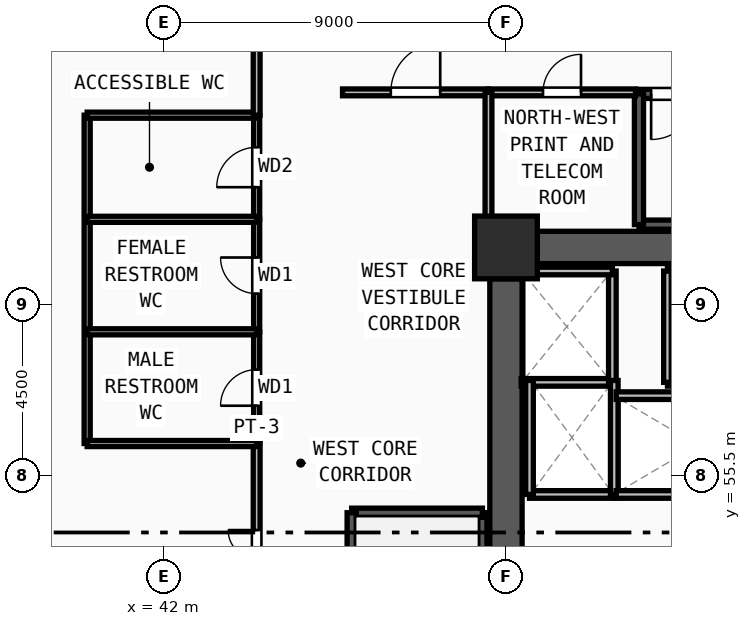
"""IFC4 building model, lengths in metres.
Left out: names, types, materials, properties, quantities, classifications, styles, units other than length and angle.
Written with IfcOpenShell. Run it as: python <this file> out.ifc"""

import sys

from ifc_helpers import new_model, si_unit, direction, frame, frame_2d, origin, origin_2d, place, context, subcontext, project, spatial, rectangle, extrude, source, transform, mapped, element, fill, save


model = new_model("IFC4")
c1 = context("Model", 3, precision=1e-05, world=origin(), true_north=direction((0.0, 1.0)))
c2 = subcontext(c1, "Body", "Model", "MODEL_VIEW")
j1 = project(units=[si_unit("LENGTHUNIT", "METRE"), si_unit("PLANEANGLEUNIT", "RADIAN")], contexts=[c1])
p1 = place(None, origin())
s1 = spatial("IfcSite", under=j1, at=p1, CompositionType="ELEMENT")
p2 = place(p1, origin())
s2 = spatial("IfcBuilding", under=s1, at=p2, CompositionType="ELEMENT")
p3 = place(p2, frame((0.0, 0.0, 28.5)))
s3 = spatial("IfcBuildingStorey", under=s2, at=p3, CompositionType="ELEMENT", Elevation=28.5)
m1 = source(origin(), c2, "Body", "SweptSolid", [
    extrude(rectangle(XDim=1.65, YDim=1.65, at=origin_2d()), origin(), (0.0, 0.0, 1.0), 3.75),
])
p4 = place(p3, frame((51.0, 61.5, 0.0), z_axis=(0.0, 0.0, 1.0), x_axis=(1.0, 0.0, 0.0)))
e1 = element("IfcColumn", 1, at=p4, inside=s3, PredefinedType="COLUMN", context=c2, shape_type="MappedRepresentation", body=[
    mapped(m1, transform((0.0, 0.0, 0.0), x_axis=(1.0, 0.0, 0.0), y_axis=(0.0, 1.0, 0.0), z_axis=(0.0, 0.0, 1.0), scale=1.0)),
])
p5 = place(p3, frame((51.825, 61.5, 0.0), z_axis=(0.0, 0.0, 1.0), x_axis=(1.0, 0.0, 0.0)))
e2 = element("IfcWall", 2, at=p5, inside=s3, PredefinedType="SHEAR", context=c2, shape_type="SweptSolid", body=[
    extrude(rectangle(XDim=7.35, YDim=0.85, at=frame_2d((3.675, 0.0))), origin(), (0.0, 0.0, 1.0), 3.57),
])
p6 = place(p3, frame((51.0, 47.325, 0.0), z_axis=(0.0, 0.0, 1.0), x_axis=(0.0, 1.0, 0.0)))
e3 = element("IfcWall", 3, at=p6, inside=s3, PredefinedType="SHEAR", context=c2, shape_type="SweptSolid", body=[
    extrude(rectangle(XDim=13.35, YDim=0.85, at=frame_2d((6.675, 0.0))), origin(), (0.0, 0.0, 1.0), 3.57),
])
p7 = place(p3, frame((50.38, 46.7, 0.0), z_axis=(0.0, 0.0, 1.0), x_axis=(0.0, 1.0, 0.0)))
e4 = element("IfcWall", 4, at=p7, inside=s3, PredefinedType="SOLIDWALL", context=c2, shape_type="SweptSolid", body=[
    extrude(rectangle(XDim=7.82, YDim=0.24, at=frame_2d((3.91, 0.0))), origin(), (0.0, 0.0, 1.0), 3.57),
])
p8 = place(p3, frame((50.38, 54.52, 0.0), z_axis=(0.0, 0.0, 1.0), x_axis=(-1.0, 0.0, 0.0)))
e5 = element("IfcWall", 5, at=p8, inside=s3, PredefinedType="SOLIDWALL", context=c2, shape_type="SweptSolid", body=[
    extrude(rectangle(XDim=3.44, YDim=0.24, at=frame_2d((1.72, 0.0))), origin(), (0.0, 0.0, 1.0), 3.57),
])
p9 = place(p3, frame((46.94, 54.52, 0.0), z_axis=(0.0, 0.0, 1.0), x_axis=(0.0, -1.0, 0.0)))
e6 = element("IfcWall", 6, at=p9, inside=s3, PredefinedType="SOLIDWALL", context=c2, shape_type="SweptSolid", body=[
    extrude(rectangle(XDim=7.82, YDim=0.24, at=frame_2d((3.91, 0.0))), origin(), (0.0, 0.0, 1.0), 3.57),
])
m2 = source(origin(), c2, "Body", "SweptSolid", [
    extrude(rectangle(XDim=1.2, YDim=2.2, at=frame_2d((0.6, 1.1))), frame((0.0, 0.13, 0.0), z_axis=(0.0, -1.0, 0.0), x_axis=(1.0, 0.0, 0.0)), (0.0, 0.0, 1.0), 0.26),
])
p10 = place(p9, frame((6.3, 0.0, 0.0)))
e7 = element("IfcOpeningElement", 7, at=p10, cuts=e6, PredefinedType="OPENING", context=c2, shape_type="MappedRepresentation", body=[
    mapped(m2, transform((0.0, 0.0, 0.0), x_axis=(1.0, 0.0, 0.0), y_axis=(0.0, 1.0, 0.0), z_axis=(0.0, 0.0, 1.0), scale=1.0)),
])
p11 = place(p3, frame((54.5, 62.1, 0.0), z_axis=(0.0, 0.0, 1.0), x_axis=(1.0, 0.0, 0.0)))
e8 = element("IfcWall", 8, at=p11, inside=s3, PredefinedType="SOLIDWALL", context=c2, shape_type="SweptSolid", body=[
    extrude(rectangle(XDim=7.82, YDim=0.24, at=frame_2d((3.91, 0.0))), origin(), (0.0, 0.0, 1.0), 3.57),
])
p12 = place(p3, frame((62.32, 65.54, 0.0), z_axis=(0.0, 0.0, 1.0), x_axis=(-1.0, 0.0, 0.0)))
e9 = element("IfcWall", 9, at=p12, inside=s3, PredefinedType="SOLIDWALL", context=c2, shape_type="SweptSolid", body=[
    extrude(rectangle(XDim=7.82, YDim=0.24, at=frame_2d((3.91, 0.0))), origin(), (0.0, 0.0, 1.0), 3.57),
])
p13 = place(p12, frame((6.3, 0.0, 0.0)))
e10 = element("IfcOpeningElement", 10, at=p13, cuts=e9, PredefinedType="OPENING", context=c2, shape_type="MappedRepresentation", body=[
    mapped(m2, transform((0.0, 0.0, 0.0), x_axis=(1.0, 0.0, 0.0), y_axis=(0.0, 1.0, 0.0), z_axis=(0.0, 0.0, 1.0), scale=1.0)),
])
p14 = place(p3, frame((54.5, 65.54, 0.0), z_axis=(0.0, 0.0, 1.0), x_axis=(0.0, -1.0, 0.0)))
e11 = element("IfcWall", 11, at=p14, inside=s3, PredefinedType="SOLIDWALL", context=c2, shape_type="SweptSolid", body=[
    extrude(rectangle(XDim=3.44, YDim=0.24, at=frame_2d((1.72, 0.0))), origin(), (0.0, 0.0, 1.0), 3.57),
])
for number, where, z_axis, x_axis in (
    (12, (55.25, 57.95, 0.0), (0.0, 0.0, 1.0), (1.0, 0.0, 0.0)),
    (13, (57.65, 60.88, 0.0), (0.0, 0.0, 1.0), (-1.0, 0.0, 0.0)),
):
    element("IfcWall", number, at=place(p3, frame(where, z_axis=z_axis, x_axis=x_axis)), inside=s3, PredefinedType="SOLIDWALL", context=c2, shape_type="SweptSolid", body=[
        extrude(rectangle(XDim=2.4, YDim=0.2, at=frame_2d((1.2, 0.0))), origin(), (0.0, 0.0, 1.0), 3.57),
    ])
p15 = place(p3, frame((55.25, 60.88, 0.0), z_axis=(0.0, 0.0, 1.0), x_axis=(0.0, -1.0, 0.0)))
e14 = element("IfcWall", 14, at=p15, inside=s3, PredefinedType="SOLIDWALL", context=c2, shape_type="SweptSolid", body=[
    extrude(rectangle(XDim=2.93, YDim=0.2, at=frame_2d((1.465, 0.0))), origin(), (0.0, 0.0, 1.0), 3.57),
])
p16 = place(p3, frame((51.4, 57.95, 0.0), z_axis=(0.0, 0.0, 1.0), x_axis=(1.0, 0.0, 0.0)))
e15 = element("IfcWall", 15, at=p16, inside=s3, PredefinedType="SOLIDWALL", context=c2, shape_type="SweptSolid", body=[
    extrude(rectangle(XDim=2.4, YDim=0.2, at=frame_2d((1.2, 0.0))), origin(), (0.0, 0.0, 1.0), 3.57),
])
p17 = place(p3, frame((53.8, 57.95, 0.0), z_axis=(0.0, 0.0, 1.0), x_axis=(0.0, 1.0, 0.0)))
e16 = element("IfcWall", 16, at=p17, inside=s3, PredefinedType="SOLIDWALL", context=c2, shape_type="SweptSolid", body=[
    extrude(rectangle(XDim=2.93, YDim=0.2, at=frame_2d((1.465, 0.0))), origin(), (0.0, 0.0, 1.0), 3.57),
])
p18 = place(p3, frame((53.8, 60.88, 0.0), z_axis=(0.0, 0.0, 1.0), x_axis=(-1.0, 0.0, 0.0)))
e17 = element("IfcWall", 17, at=p18, inside=s3, PredefinedType="SOLIDWALL", context=c2, shape_type="SweptSolid", body=[
    extrude(rectangle(XDim=2.4, YDim=0.2, at=frame_2d((1.2, 0.0))), origin(), (0.0, 0.0, 1.0), 3.57),
])
p19 = place(p3, frame((51.62, 55.0, 0.0), z_axis=(0.0, 0.0, 1.0), x_axis=(1.0, 0.0, 0.0)))
e18 = element("IfcWall", 18, at=p19, inside=s3, PredefinedType="SOLIDWALL", context=c2, shape_type="SweptSolid", body=[
    extrude(rectangle(XDim=2.23, YDim=0.2, at=frame_2d((1.115, 0.0))), origin(), (0.0, 0.0, 1.0), 3.57),
])
for number, where, z_axis, x_axis in (
    (19, (53.85, 55.0, 0.0), (0.0, 0.0, 1.0), (0.0, 1.0, 0.0)),
    (20, (51.62, 58.0, 0.0), (0.0, 0.0, 1.0), (0.0, -1.0, 0.0)),
):
    element("IfcWall", number, at=place(p3, frame(where, z_axis=z_axis, x_axis=x_axis)), inside=s3, PredefinedType="SOLIDWALL", context=c2, shape_type="SweptSolid", body=[
        extrude(rectangle(XDim=3.0, YDim=0.2, at=frame_2d((1.5, 0.0))), origin(), (0.0, 0.0, 1.0), 3.57),
    ])
for number, where, z_axis, x_axis in (
    (21, (53.9, 55.0, 0.0), (0.0, 0.0, 1.0), (1.0, 0.0, 0.0)),
    (22, (56.2, 57.6, 0.0), (0.0, 0.0, 1.0), (-1.0, 0.0, 0.0)),
):
    element("IfcWall", number, at=place(p3, frame(where, z_axis=z_axis, x_axis=x_axis)), inside=s3, PredefinedType="SOLIDWALL", context=c2, shape_type="SweptSolid", body=[
        extrude(rectangle(XDim=2.3, YDim=0.2, at=frame_2d((1.15, 0.0))), origin(), (0.0, 0.0, 1.0), 3.57),
    ])
p20 = place(p3, frame((44.44, 56.34, 0.0), z_axis=(0.0, 0.0, 1.0), x_axis=(0.0, 1.0, 0.0)))
e23 = element("IfcWall", 23, at=p20, inside=s3, PredefinedType="PARTITIONING", context=c2, shape_type="SweptSolid", body=[
    extrude(rectangle(XDim=2.94, YDim=0.16, at=frame_2d((1.47, 0.0))), origin(), (0.0, 0.0, 1.0), 3.57),
])
m3 = source(origin(), c2, "Body", "SweptSolid", [
    extrude(rectangle(XDim=0.95, YDim=2.15, at=frame_2d((0.475, 1.075))), frame((0.0, 0.09, 0.0), z_axis=(0.0, -1.0, 0.0), x_axis=(1.0, 0.0, 0.0)), (0.0, 0.0, 1.0), 0.18),
])
p21 = place(p20, frame((0.995, 0.0, 0.0)))
e24 = element("IfcOpeningElement", 24, at=p21, cuts=e23, PredefinedType="OPENING", context=c2, shape_type="MappedRepresentation", body=[
    mapped(m3, transform((0.0, 0.0, 0.0), x_axis=(1.0, 0.0, 0.0), y_axis=(0.0, 1.0, 0.0), z_axis=(0.0, 0.0, 1.0), scale=1.0)),
])
p22 = place(p3, frame((44.44, 59.28, 0.0), z_axis=(0.0, 0.0, 1.0), x_axis=(0.0, 1.0, 0.0)))
e25 = element("IfcWall", 25, at=p22, inside=s3, PredefinedType="PARTITIONING", context=c2, shape_type="SweptSolid", body=[
    extrude(rectangle(XDim=2.96, YDim=0.16, at=frame_2d((1.48, 0.0))), origin(), (0.0, 0.0, 1.0), 3.57),
])
p23 = place(p22, frame((1.005, 0.0, 0.0)))
e26 = element("IfcOpeningElement", 26, at=p23, cuts=e25, PredefinedType="OPENING", context=c2, shape_type="MappedRepresentation", body=[
    mapped(m3, transform((0.0, 0.0, 0.0), x_axis=(1.0, 0.0, 0.0), y_axis=(0.0, 1.0, 0.0), z_axis=(0.0, 0.0, 1.0), scale=1.0)),
])
p24 = place(p3, frame((44.44, 62.24, 0.0), z_axis=(0.0, 0.0, 1.0), x_axis=(0.0, 1.0, 0.0)))
e27 = element("IfcWall", 27, at=p24, inside=s3, PredefinedType="PARTITIONING", context=c2, shape_type="SweptSolid", body=[
    extrude(rectangle(XDim=2.74, YDim=0.16, at=frame_2d((1.37, 0.0))), origin(), (0.0, 0.0, 1.0), 3.57),
])
m4 = source(origin(), c2, "Body", "SweptSolid", [
    extrude(rectangle(XDim=1.05, YDim=2.15, at=frame_2d((0.525, 1.075))), frame((0.0, 0.09, 0.0), z_axis=(0.0, -1.0, 0.0), x_axis=(1.0, 0.0, 0.0)), (0.0, 0.0, 1.0), 0.18),
])
p25 = place(p24, frame((0.845, 0.0, 0.0)))
e28 = element("IfcOpeningElement", 28, at=p25, cuts=e27, PredefinedType="OPENING", context=c2, shape_type="MappedRepresentation", body=[
    mapped(m4, transform((0.0, 0.0, 0.0), x_axis=(1.0, 0.0, 0.0), y_axis=(0.0, 1.0, 0.0), z_axis=(0.0, 0.0, 1.0), scale=1.0)),
])
p26 = place(p3, frame((50.54, 65.58, 0.0), z_axis=(0.0, 0.0, 1.0), x_axis=(1.0, 0.0, 0.0)))
e29 = element("IfcWall", 29, at=p26, inside=s3, PredefinedType="PARTITIONING", context=c2, shape_type="SweptSolid", body=[
    extrude(rectangle(XDim=3.87, YDim=0.18, at=frame_2d((1.935, 0.0))), origin(), (0.0, 0.0, 1.0), 3.57),
])
m5 = source(origin(), c2, "Body", "SweptSolid", [
    extrude(rectangle(XDim=1.0, YDim=2.2, at=frame_2d((0.5, 1.1))), frame((0.0, 0.1, 0.0), z_axis=(0.0, -1.0, 0.0), x_axis=(1.0, 0.0, 0.0)), (0.0, 0.0, 1.0), 0.2),
])
p27 = place(p26, frame((1.435, 0.0, 0.0)))
e30 = element("IfcOpeningElement", 30, at=p27, cuts=e29, PredefinedType="OPENING", context=c2, shape_type="MappedRepresentation", body=[
    mapped(m5, transform((0.0, 0.0, 0.0), x_axis=(1.0, 0.0, 0.0), y_axis=(0.0, 1.0, 0.0), z_axis=(0.0, 0.0, 1.0), scale=1.0)),
])
p28 = place(p3, frame((46.7, 65.58, 0.0), z_axis=(0.0, 0.0, 1.0), x_axis=(1.0, 0.0, 0.0)))
e31 = element("IfcWall", 31, at=p28, inside=s3, PredefinedType="PARTITIONING", context=c2, shape_type="SweptSolid", body=[
    extrude(rectangle(XDim=3.84, YDim=0.18, at=frame_2d((1.92, 0.0))), origin(), (0.0, 0.0, 1.0), 3.57),
])
m6 = source(origin(), c2, "Body", "SweptSolid", [
    extrude(rectangle(XDim=1.3, YDim=2.2, at=frame_2d((0.65, 1.1))), frame((0.0, 0.1, 0.0), z_axis=(0.0, -1.0, 0.0), x_axis=(1.0, 0.0, 0.0)), (0.0, 0.0, 1.0), 0.2),
])
p29 = place(p28, frame((1.27, 0.0, 0.0)))
e32 = element("IfcOpeningElement", 32, at=p29, cuts=e31, PredefinedType="OPENING", context=c2, shape_type="MappedRepresentation", body=[
    mapped(m6, transform((0.0, 0.0, 0.0), x_axis=(1.0, 0.0, 0.0), y_axis=(0.0, 1.0, 0.0), z_axis=(0.0, 0.0, 1.0), scale=1.0)),
])
p30 = place(p3, frame((44.44, 50.285, 0.0), z_axis=(0.0, 0.0, 1.0), x_axis=(0.0, 1.0, 0.0)))
e33 = element("IfcWall", 33, at=p30, inside=s3, PredefinedType="PARTITIONING", context=c2, shape_type="SweptSolid", body=[
    extrude(rectangle(XDim=6.055, YDim=0.18, at=frame_2d((3.028, 0.0))), origin(), (0.0, 0.0, 1.0), 3.57),
])
m7 = source(origin(), c2, "Body", "SweptSolid", [
    extrude(rectangle(XDim=1.5, YDim=2.2, at=frame_2d((0.75, 1.1))), frame((0.0, 0.1, 0.0), z_axis=(0.0, -1.0, 0.0), x_axis=(1.0, 0.0, 0.0)), (0.0, 0.0, 1.0), 0.2),
])
p31 = place(p30, frame((2.278, 0.0, 0.0)))
e34 = element("IfcOpeningElement", 34, at=p31, cuts=e33, PredefinedType="OPENING", context=c2, shape_type="MappedRepresentation", body=[
    mapped(m7, transform((0.0, 0.0, 0.0), x_axis=(1.0, 0.0, 0.0), y_axis=(0.0, 1.0, 0.0), z_axis=(0.0, 0.0, 1.0), scale=1.0)),
])
p32 = place(p3, frame((39.98, 56.34, 0.0), z_axis=(0.0, 0.0, 1.0), x_axis=(0.0, 1.0, 0.0)))
e35 = element("IfcWall", 35, at=p32, inside=s3, PredefinedType="PARTITIONING", context=c2, shape_type="SweptSolid", body=[
    extrude(rectangle(XDim=8.64, YDim=0.16, at=frame_2d((4.32, 0.0))), origin(), (0.0, 0.0, 1.0), 3.57),
])
for number, where, z_axis, x_axis in (
    (36, (39.98, 56.34, 0.0), (0.0, 0.0, 1.0), (1.0, 0.0, 0.0)),
    (37, (39.98, 59.28, 0.0), (0.0, 0.0, 1.0), (1.0, 0.0, 0.0)),
    (38, (39.98, 62.24, 0.0), (0.0, 0.0, 1.0), (1.0, 0.0, 0.0)),
    (39, (39.98, 64.98, 0.0), (0.0, 0.0, 1.0), (1.0, 0.0, 0.0)),
):
    element("IfcWall", number, at=place(p3, frame(where, z_axis=z_axis, x_axis=x_axis)), inside=s3, PredefinedType="PARTITIONING", context=c2, shape_type="SweptSolid", body=[
        extrude(rectangle(XDim=4.46, YDim=0.16, at=frame_2d((2.23, 0.0))), origin(), (0.0, 0.0, 1.0), 3.57),
    ])
p33 = place(p3, frame((50.54, 61.95, 0.0), z_axis=(0.0, 0.0, 1.0), x_axis=(0.0, 1.0, 0.0)))
e40 = element("IfcWall", 40, at=p33, inside=s3, PredefinedType="PARTITIONING", context=c2, shape_type="SweptSolid", body=[
    extrude(rectangle(XDim=3.63, YDim=0.18, at=frame_2d((1.815, 0.0))), origin(), (0.0, 0.0, 1.0), 3.57),
])
p34 = place(p3, frame((44.44, 64.98, 0.0), z_axis=(0.0, 0.0, 1.0), x_axis=(0.0, 1.0, 0.0)))
e41 = element("IfcWall", 41, at=p34, inside=s3, PredefinedType="PARTITIONING", context=c2, shape_type="SweptSolid", body=[
    extrude(rectangle(XDim=1.805, YDim=0.18, at=frame_2d((0.902, 0.0))), origin(), (0.0, 0.0, 1.0), 3.57),
])
m8 = source(origin(), c2, "Body", "SweptSolid", [
    extrude(rectangle(XDim=1.2, YDim=2.2, at=frame_2d((0.6, 1.1))), frame((0.0, 0.025, 0.0), z_axis=(0.0, -1.0, 0.0), x_axis=(1.0, 0.0, 0.0)), (0.0, 0.0, 1.0), 0.05),
])
p35 = place(p13, origin())
e42 = element("IfcDoor", 42, at=p35, inside=s3, OperationType="SINGLE_SWING_RIGHT", PredefinedType="DOOR", context=c2, shape_type="MappedRepresentation", body=[
    mapped(m8, transform((0.0, 0.0, 0.0), x_axis=(1.0, 0.0, 0.0), y_axis=(0.0, 1.0, 0.0), z_axis=(0.0, 0.0, 1.0), scale=1.0)),
])
fill(e10, e42)
m9 = source(origin(), c2, "Body", "SweptSolid", [
    extrude(rectangle(XDim=0.95, YDim=2.15, at=frame_2d((0.475, 1.075))), frame((0.0, 0.025, 0.0), z_axis=(0.0, -1.0, 0.0), x_axis=(1.0, 0.0, 0.0)), (0.0, 0.0, 1.0), 0.05),
])
p36 = place(p21, origin())
e43 = element("IfcDoor", 43, at=p36, inside=s3, OperationType="SINGLE_SWING_LEFT", PredefinedType="DOOR", context=c2, shape_type="MappedRepresentation", body=[
    mapped(m9, transform((0.0, 0.0, 0.0), x_axis=(1.0, 0.0, 0.0), y_axis=(0.0, 1.0, 0.0), z_axis=(0.0, 0.0, 1.0), scale=1.0)),
])
fill(e24, e43)
p37 = place(p23, origin())
e44 = element("IfcDoor", 44, at=p37, inside=s3, OperationType="SINGLE_SWING_RIGHT", PredefinedType="DOOR", context=c2, shape_type="MappedRepresentation", body=[
    mapped(m9, transform((0.0, 0.0, 0.0), x_axis=(1.0, 0.0, 0.0), y_axis=(0.0, 1.0, 0.0), z_axis=(0.0, 0.0, 1.0), scale=1.0)),
])
fill(e26, e44)
m10 = source(origin(), c2, "Body", "SweptSolid", [
    extrude(rectangle(XDim=1.05, YDim=2.15, at=frame_2d((0.525, 1.075))), frame((0.0, 0.025, 0.0), z_axis=(0.0, -1.0, 0.0), x_axis=(1.0, 0.0, 0.0)), (0.0, 0.0, 1.0), 0.05),
])
p38 = place(p25, origin())
e45 = element("IfcDoor", 45, at=p38, inside=s3, OperationType="SINGLE_SWING_LEFT", PredefinedType="DOOR", context=c2, shape_type="MappedRepresentation", body=[
    mapped(m10, transform((0.0, 0.0, 0.0), x_axis=(1.0, 0.0, 0.0), y_axis=(0.0, 1.0, 0.0), z_axis=(0.0, 0.0, 1.0), scale=1.0)),
])
fill(e28, e45)
m11 = source(origin(), c2, "Body", "SweptSolid", [
    extrude(rectangle(XDim=1.0, YDim=2.2, at=frame_2d((0.5, 1.1))), frame((0.0, 0.025, 0.0), z_axis=(0.0, -1.0, 0.0), x_axis=(1.0, 0.0, 0.0)), (0.0, 0.0, 1.0), 0.05),
])
p39 = place(p27, origin())
e46 = element("IfcDoor", 46, at=p39, inside=s3, OperationType="SINGLE_SWING_RIGHT", PredefinedType="DOOR", context=c2, shape_type="MappedRepresentation", body=[
    mapped(m11, transform((0.0, 0.0, 0.0), x_axis=(1.0, 0.0, 0.0), y_axis=(0.0, 1.0, 0.0), z_axis=(0.0, 0.0, 1.0), scale=1.0)),
])
fill(e30, e46)
m12 = source(origin(), c2, "Body", "SweptSolid", [
    extrude(rectangle(XDim=1.3, YDim=2.2, at=frame_2d((0.65, 1.1))), frame((0.0, 0.025, 0.0), z_axis=(0.0, -1.0, 0.0), x_axis=(1.0, 0.0, 0.0)), (0.0, 0.0, 1.0), 0.05),
])
p40 = place(p29, origin())
e47 = element("IfcDoor", 47, at=p40, inside=s3, OperationType="SINGLE_SWING_RIGHT", PredefinedType="DOOR", context=c2, shape_type="MappedRepresentation", body=[
    mapped(m12, transform((0.0, 0.0, 0.0), x_axis=(1.0, 0.0, 0.0), y_axis=(0.0, 1.0, 0.0), z_axis=(0.0, 0.0, 1.0), scale=1.0)),
])
fill(e32, e47)
m13 = source(origin(), c2, "Body", "SweptSolid", [
    extrude(rectangle(XDim=1.5, YDim=2.2, at=frame_2d((0.75, 1.1))), frame((0.0, 0.025, 0.0), z_axis=(0.0, -1.0, 0.0), x_axis=(1.0, 0.0, 0.0)), (0.0, 0.0, 1.0), 0.05),
])
p41 = place(p31, origin())
e48 = element("IfcDoor", 48, at=p41, inside=s3, OperationType="DOUBLE_DOOR_SINGLE_SWING", PredefinedType="DOOR", context=c2, shape_type="MappedRepresentation", body=[
    mapped(m13, transform((0.0, 0.0, 0.0), x_axis=(1.0, 0.0, 0.0), y_axis=(0.0, 1.0, 0.0), z_axis=(0.0, 0.0, 1.0), scale=1.0)),
])
fill(e34, e48)
save(model, sys.argv[1])
